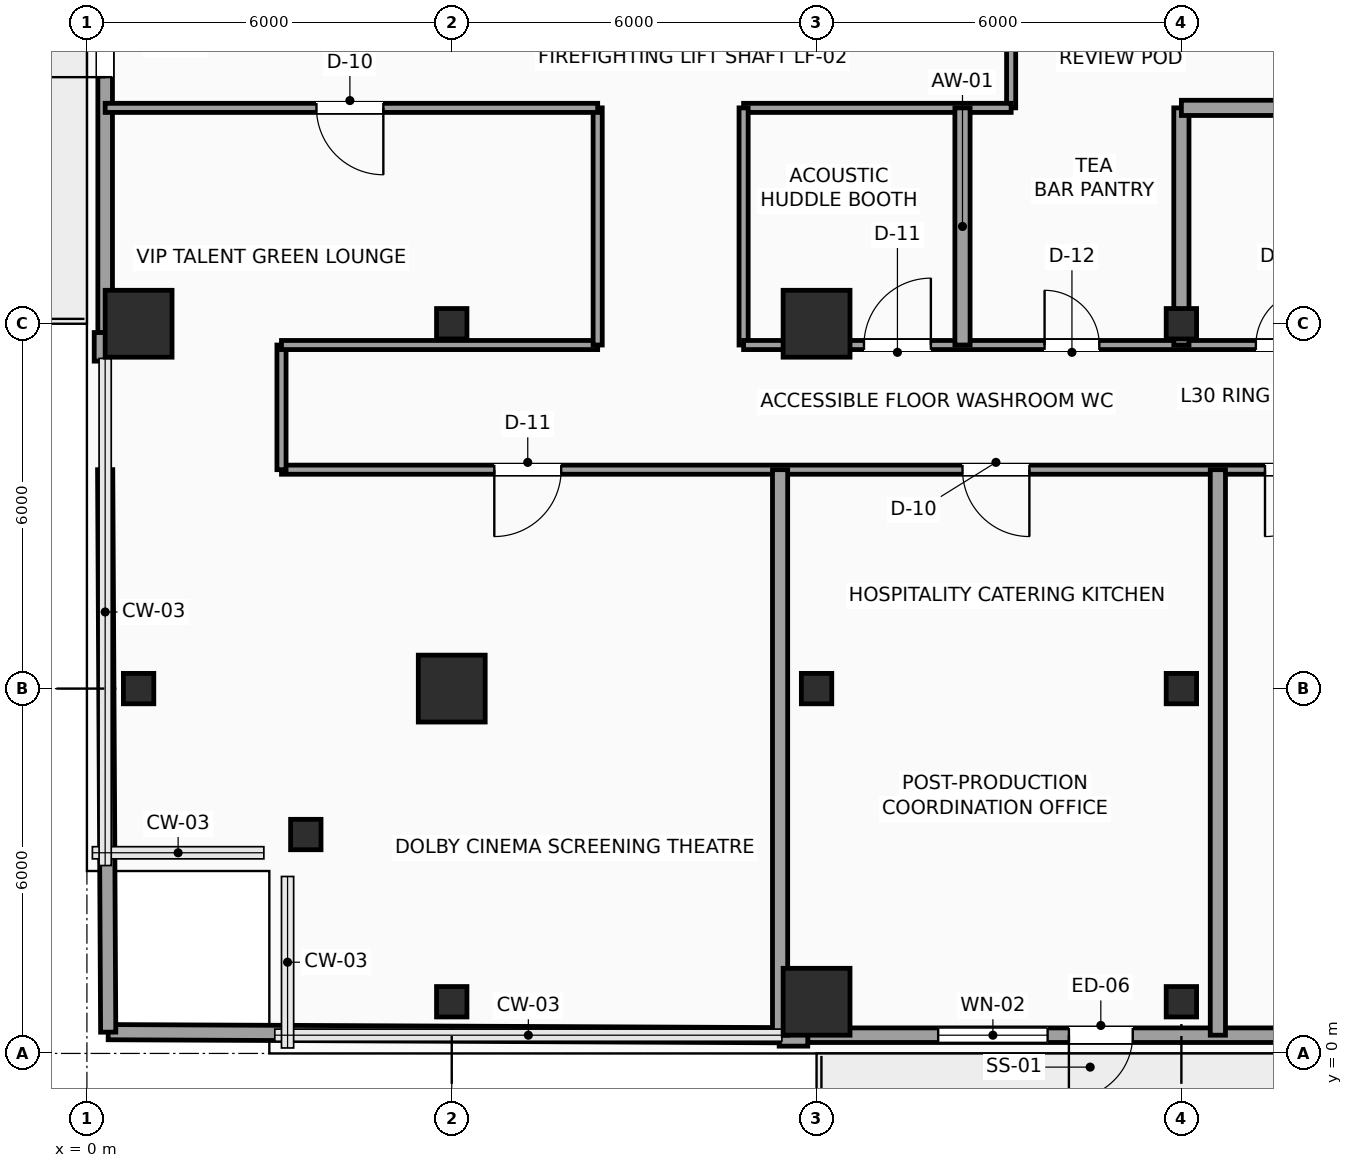
"""IFC4 building model, lengths in metres.
Left out: names, types, materials, properties, quantities, classifications, styles, units other than length and angle.
Written with IfcOpenShell. Run it as: python <this file> out.ifc"""

import sys

from ifc_helpers import new_model, si_unit, direction, frame, frame_2d, origin, origin_2d, place, context, subcontext, project, spatial, rectangle, hollow_rectangle, extrude, element, fill, save


model = new_model("IFC4")
c1 = context("Model", 3, precision=1e-05, world=origin(), true_north=direction((0.0, 1.0)))
c2 = subcontext(c1, "Body", "Model", "MODEL_VIEW")
j1 = project(units=[si_unit("LENGTHUNIT", "METRE"), si_unit("PLANEANGLEUNIT", "RADIAN")], contexts=[c1])
p1 = place(None, origin())
s1 = spatial("IfcSite", under=j1, at=p1, CompositionType="ELEMENT")
p2 = place(p1, origin())
s2 = spatial("IfcBuilding", under=s1, at=p2, CompositionType="ELEMENT")
p3 = place(p2, frame((0.0, 0.0, 126.9)))
s3 = spatial("IfcBuildingStorey", under=s2, at=p3, CompositionType="ELEMENT", Elevation=126.9)
for number, where, z_axis, x_axis in (
    (1, (3.6, 3.6, 0.0), (0.0, 0.0, 1.0), (1.0, 0.0, 0.0)),
    (2, (0.85, 6.0, 0.0), (0.0, 0.0, 1.0), (1.0, 0.0, 0.0)),
):
    element("IfcColumn", number, at=place(p3, frame(where, z_axis=z_axis, x_axis=x_axis)), inside=s3, PredefinedType="COLUMN", context=c2, shape_type="SweptSolid", body=[
        extrude(hollow_rectangle(XDim=0.5, YDim=0.5, WallThickness=0.025, InnerFilletRadius=0.025, OuterFilletRadius=0.04, at=origin_2d()), origin(), (0.0, 0.0, 1.0), 3.75),
    ])
p4 = place(p3, frame((0.85, 12.0, 0.0), z_axis=(0.0, 0.0, 1.0), x_axis=(1.0, 0.0, 0.0)))
e3 = element("IfcColumn", 3, at=p4, inside=s3, PredefinedType="COLUMN", context=c2, shape_type="SweptSolid", body=[
    extrude(rectangle(XDim=1.1, YDim=1.1, at=origin_2d()), origin(), (0.0, 0.0, 1.0), 3.75),
])
p5 = place(p3, frame((6.0, 0.85, 0.0), z_axis=(0.0, 0.0, 1.0), x_axis=(1.0, 0.0, 0.0)))
e4 = element("IfcColumn", 4, at=p5, inside=s3, PredefinedType="COLUMN", context=c2, shape_type="SweptSolid", body=[
    extrude(hollow_rectangle(XDim=0.5, YDim=0.5, WallThickness=0.025, InnerFilletRadius=0.025, OuterFilletRadius=0.04, at=origin_2d()), origin(), (0.0, 0.0, 1.0), 3.75),
])
p6 = place(p3, frame((6.0, 6.0, 0.0), z_axis=(0.0, 0.0, 1.0), x_axis=(1.0, 0.0, 0.0)))
e5 = element("IfcColumn", 5, at=p6, inside=s3, PredefinedType="COLUMN", context=c2, shape_type="SweptSolid", body=[
    extrude(rectangle(XDim=1.1, YDim=1.1, at=origin_2d()), origin(), (0.0, 0.0, 1.0), 3.75),
])
p7 = place(p3, frame((6.0, 12.0, 0.0), z_axis=(0.0, 0.0, 1.0), x_axis=(1.0, 0.0, 0.0)))
e6 = element("IfcColumn", 6, at=p7, inside=s3, PredefinedType="COLUMN", context=c2, shape_type="SweptSolid", body=[
    extrude(hollow_rectangle(XDim=0.5, YDim=0.5, WallThickness=0.025, InnerFilletRadius=0.025, OuterFilletRadius=0.04, at=origin_2d()), origin(), (0.0, 0.0, 1.0), 3.75),
])
p8 = place(p3, frame((12.0, 0.85, 0.0), z_axis=(0.0, 0.0, 1.0), x_axis=(1.0, 0.0, 0.0)))
e7 = element("IfcColumn", 7, at=p8, inside=s3, PredefinedType="COLUMN", context=c2, shape_type="SweptSolid", body=[
    extrude(rectangle(XDim=1.1, YDim=1.1, at=origin_2d()), origin(), (0.0, 0.0, 1.0), 3.75),
])
p9 = place(p3, frame((12.0, 6.0, 0.0), z_axis=(0.0, 0.0, 1.0), x_axis=(1.0, 0.0, 0.0)))
e8 = element("IfcColumn", 8, at=p9, inside=s3, PredefinedType="COLUMN", context=c2, shape_type="SweptSolid", body=[
    extrude(hollow_rectangle(XDim=0.5, YDim=0.5, WallThickness=0.025, InnerFilletRadius=0.025, OuterFilletRadius=0.04, at=origin_2d()), origin(), (0.0, 0.0, 1.0), 3.75),
])
p10 = place(p3, frame((12.0, 12.0, 0.0), z_axis=(0.0, 0.0, 1.0), x_axis=(1.0, 0.0, 0.0)))
e9 = element("IfcColumn", 9, at=p10, inside=s3, PredefinedType="COLUMN", context=c2, shape_type="SweptSolid", body=[
    extrude(rectangle(XDim=1.1, YDim=1.1, at=origin_2d()), origin(), (0.0, 0.0, 1.0), 3.75),
])
for number, where, z_axis, x_axis in (
    (10, (18.0, 0.85, 0.0), (0.0, 0.0, 1.0), (1.0, 0.0, 0.0)),
    (11, (18.0, 6.0, 0.0), (0.0, 0.0, 1.0), (1.0, 0.0, 0.0)),
    (12, (18.0, 12.0, 0.0), (0.0, 0.0, 1.0), (1.0, 0.0, 0.0)),
):
    element("IfcColumn", number, at=place(p3, frame(where, z_axis=z_axis, x_axis=x_axis)), inside=s3, PredefinedType="COLUMN", context=c2, shape_type="SweptSolid", body=[
        extrude(hollow_rectangle(XDim=0.5, YDim=0.5, WallThickness=0.025, InnerFilletRadius=0.025, OuterFilletRadius=0.04, at=origin_2d()), origin(), (0.0, 0.0, 1.0), 3.75),
    ])
p11 = place(p3, frame((21.145, 0.3, 0.0), z_axis=(0.0, 0.0, 1.0), x_axis=(-1.0, 0.0, 0.0)))
e13 = element("IfcWall", 13, at=p11, inside=s3, PredefinedType="SOLIDWALL", context=c2, shape_type="SweptSolid", body=[
    extrude(rectangle(XDim=9.29, YDim=0.24, at=frame_2d((4.645, 0.0))), origin(), (0.0, 0.0, 1.0), 3.525),
])
p12 = place(p11, frame((3.945, 0.0, 0.0)))
e14 = element("IfcOpeningElement", 14, at=p12, cuts=e13, PredefinedType="OPENING", context=c2, shape_type="SweptSolid", body=[
    extrude(rectangle(XDim=1.05, YDim=2.2, at=frame_2d((0.525, 1.1))), frame((0.0, 0.13, 0.0), z_axis=(0.0, -1.0, 0.0), x_axis=(1.0, 0.0, 0.0)), (0.0, 0.0, 1.0), 0.26),
])
p13 = place(p11, frame((5.345, 0.0, 0.85)))
e15 = element("IfcOpeningElement", 15, at=p13, cuts=e13, PredefinedType="OPENING", context=c2, shape_type="SweptSolid", body=[
    extrude(rectangle(XDim=1.8, YDim=2.1, at=frame_2d((0.9, 1.05))), frame((0.0, 0.13, 0.0), z_axis=(0.0, -1.0, 0.0), x_axis=(1.0, 0.0, 0.0)), (0.0, 0.0, 1.0), 0.26),
])
p14 = place(p3, frame((0.3, 11.855, 0.0), z_axis=(0.0, 0.0, 1.0), x_axis=(0.0, 1.0, 0.0)))
e16 = element("IfcWall", 16, at=p14, inside=s3, PredefinedType="SOLIDWALL", context=c2, shape_type="SweptSolid", body=[
    extrude(rectangle(XDim=9.29, YDim=0.24, at=frame_2d((4.645, 0.0))), origin(), (0.0, 0.0, 1.0), 3.525),
])
p15 = place(p14, frame((4.2, 0.0, 0.0)))
e17 = element("IfcOpeningElement", 17, at=p15, cuts=e16, PredefinedType="OPENING", context=c2, shape_type="SweptSolid", body=[
    extrude(rectangle(XDim=1.05, YDim=2.2, at=frame_2d((0.525, 1.1))), frame((0.0, 0.13, 0.0), z_axis=(0.0, -1.0, 0.0), x_axis=(1.0, 0.0, 0.0)), (0.0, 0.0, 1.0), 0.26),
])
p16 = place(p14, frame((6.8, 0.0, 0.85)))
e18 = element("IfcOpeningElement", 18, at=p16, cuts=e16, PredefinedType="OPENING", context=c2, shape_type="SweptSolid", body=[
    extrude(rectangle(XDim=1.8, YDim=2.1, at=frame_2d((0.9, 1.05))), frame((0.0, 0.13, 0.0), z_axis=(0.0, -1.0, 0.0), x_axis=(1.0, 0.0, 0.0)), (0.0, 0.0, 1.0), 0.26),
])
for number, where, z_axis, x_axis in (
    (19, (0.24, 11.385, 0.0), (0.0, 0.0, 1.0), (0.0, 1.0, 0.0)),
    (20, (11.855, 0.24, 0.0), (0.0, 0.0, 1.0), (-1.0, 0.0, 0.0)),
):
    element("IfcWall", number, at=place(p3, frame(where, z_axis=z_axis, x_axis=x_axis)), inside=s3, PredefinedType="SOLIDWALL", context=c2, shape_type="SweptSolid", body=[
        extrude(rectangle(XDim=0.47, YDim=0.24, at=frame_2d((0.235, 0.0))), origin(), (0.0, 0.0, 1.0), 3.525),
    ])
p17 = place(p3, frame((21.35, 9.6, 0.0), z_axis=(0.0, 0.0, 1.0), x_axis=(-1.0, 0.0, 0.0)))
e21 = element("IfcWall", 21, at=p17, inside=s3, PredefinedType="PARTITIONING", context=c2, shape_type="SweptSolid", body=[
    extrude(rectangle(XDim=18.15, YDim=0.15, at=frame_2d((9.075, 0.0))), origin(), (0.0, 0.0, 1.0), 3.525),
])
p18 = place(p17, frame((13.55, 0.0, 0.0)))
e22 = element("IfcOpeningElement", 22, at=p18, cuts=e21, PredefinedType="OPENING", context=c2, shape_type="SweptSolid", body=[
    extrude(rectangle(XDim=1.1, YDim=2.25, at=frame_2d((0.55, 1.125))), frame((0.0, 0.085, 0.0), z_axis=(0.0, -1.0, 0.0), x_axis=(1.0, 0.0, 0.0)), (0.0, 0.0, 1.0), 0.17),
])
p19 = place(p17, frame((5.85, 0.0, 0.0)))
e23 = element("IfcOpeningElement", 23, at=p19, cuts=e21, PredefinedType="OPENING", context=c2, shape_type="SweptSolid", body=[
    extrude(rectangle(XDim=1.1, YDim=2.25, at=frame_2d((0.55, 1.125))), frame((0.0, 0.085, 0.0), z_axis=(0.0, -1.0, 0.0), x_axis=(1.0, 0.0, 0.0)), (0.0, 0.0, 1.0), 0.17),
])
p20 = place(p17, frame((0.875, 0.0, 0.0)))
e24 = element("IfcOpeningElement", 24, at=p20, cuts=e21, PredefinedType="OPENING", context=c2, shape_type="SweptSolid", body=[
    extrude(rectangle(XDim=1.1, YDim=2.25, at=frame_2d((0.55, 1.125))), frame((0.0, 0.085, 0.0), z_axis=(0.0, -1.0, 0.0), x_axis=(1.0, 0.0, 0.0)), (0.0, 0.0, 1.0), 0.17),
])
p21 = place(p3, frame((3.2, 9.6, 0.0), z_axis=(0.0, 0.0, 1.0), x_axis=(0.0, 1.0, 0.0)))
e25 = element("IfcWall", 25, at=p21, inside=s3, PredefinedType="PARTITIONING", context=c2, shape_type="SweptSolid", body=[
    extrude(rectangle(XDim=2.05, YDim=0.15, at=frame_2d((1.025, 0.0))), origin(), (0.0, 0.0, 1.0), 3.525),
])
p22 = place(p3, frame((3.2, 11.65, 0.0), z_axis=(0.0, 0.0, 1.0), x_axis=(1.0, 0.0, 0.0)))
e26 = element("IfcWall", 26, at=p22, inside=s3, PredefinedType="PARTITIONING", context=c2, shape_type="SweptSolid", body=[
    extrude(rectangle(XDim=5.2, YDim=0.15, at=frame_2d((2.6, 0.0))), origin(), (0.0, 0.0, 1.0), 3.525),
])
p23 = place(p3, frame((8.4, 11.65, 0.0), z_axis=(0.0, 0.0, 1.0), x_axis=(0.0, 1.0, 0.0)))
e27 = element("IfcWall", 27, at=p23, inside=s3, PredefinedType="PARTITIONING", context=c2, shape_type="SweptSolid", body=[
    extrude(rectangle(XDim=3.9, YDim=0.15, at=frame_2d((1.95, 0.0))), origin(), (0.0, 0.0, 1.0), 3.525),
])
p24 = place(p3, frame((8.4, 15.55, 0.0), z_axis=(0.0, 0.0, 1.0), x_axis=(-1.0, 0.0, 0.0)))
e28 = element("IfcWall", 28, at=p24, inside=s3, PredefinedType="PARTITIONING", context=c2, shape_type="SweptSolid", body=[
    extrude(rectangle(XDim=8.1, YDim=0.15, at=frame_2d((4.05, 0.0))), origin(), (0.0, 0.0, 1.0), 3.525),
])
p25 = place(p24, frame((3.525, 0.0, 0.0)))
e29 = element("IfcOpeningElement", 29, at=p25, cuts=e28, PredefinedType="OPENING", context=c2, shape_type="SweptSolid", body=[
    extrude(rectangle(XDim=1.1, YDim=2.25, at=frame_2d((0.55, 1.125))), frame((0.0, 0.085, 0.0), z_axis=(0.0, -1.0, 0.0), x_axis=(1.0, 0.0, 0.0)), (0.0, 0.0, 1.0), 0.17),
])
p26 = place(p3, frame((15.2, 17.95, 0.0), z_axis=(0.0, 0.0, 1.0), x_axis=(0.0, -1.0, 0.0)))
e30 = element("IfcWall", 30, at=p26, inside=s3, PredefinedType="PARTITIONING", context=c2, shape_type="SweptSolid", body=[
    extrude(rectangle(XDim=2.4, YDim=0.15, at=frame_2d((1.2, 0.0))), origin(), (0.0, 0.0, 1.0), 3.525),
])
p27 = place(p3, frame((15.2, 15.55, 0.0), z_axis=(0.0, 0.0, 1.0), x_axis=(-1.0, 0.0, 0.0)))
e31 = element("IfcWall", 31, at=p27, inside=s3, PredefinedType="PARTITIONING", context=c2, shape_type="SweptSolid", body=[
    extrude(rectangle(XDim=4.4, YDim=0.15, at=frame_2d((2.2, 0.0))), origin(), (0.0, 0.0, 1.0), 3.525),
])
p28 = place(p3, frame((10.8, 15.55, 0.0), z_axis=(0.0, 0.0, 1.0), x_axis=(0.0, -1.0, 0.0)))
e32 = element("IfcWall", 32, at=p28, inside=s3, PredefinedType="PARTITIONING", context=c2, shape_type="SweptSolid", body=[
    extrude(rectangle(XDim=3.9, YDim=0.15, at=frame_2d((1.95, 0.0))), origin(), (0.0, 0.0, 1.0), 3.525),
])
p29 = place(p3, frame((10.8, 11.65, 0.0), z_axis=(0.0, 0.0, 1.0), x_axis=(1.0, 0.0, 0.0)))
e33 = element("IfcWall", 33, at=p29, inside=s3, PredefinedType="PARTITIONING", context=c2, shape_type="SweptSolid", body=[
    extrude(rectangle(XDim=10.55, YDim=0.15, at=frame_2d((5.275, 0.0))), origin(), (0.0, 0.0, 1.0), 3.525),
])
p30 = place(p29, frame((1.98, 0.0, 0.0)))
e34 = element("IfcOpeningElement", 34, at=p30, cuts=e33, PredefinedType="OPENING", context=c2, shape_type="SweptSolid", body=[
    extrude(rectangle(XDim=1.1, YDim=2.25, at=frame_2d((0.55, 1.125))), frame((0.0, 0.085, 0.0), z_axis=(0.0, -1.0, 0.0), x_axis=(1.0, 0.0, 0.0)), (0.0, 0.0, 1.0), 0.17),
])
p31 = place(p29, frame((4.95, 0.0, 0.0)))
e35 = element("IfcOpeningElement", 35, at=p31, cuts=e33, PredefinedType="OPENING", context=c2, shape_type="SweptSolid", body=[
    extrude(rectangle(XDim=0.9, YDim=2.1, at=frame_2d((0.45, 1.05))), frame((0.0, 0.085, 0.0), z_axis=(0.0, -1.0, 0.0), x_axis=(1.0, 0.0, 0.0)), (0.0, 0.0, 1.0), 0.17),
])
p32 = place(p29, frame((8.425, 0.0, 0.0)))
e36 = element("IfcOpeningElement", 36, at=p32, cuts=e33, PredefinedType="OPENING", context=c2, shape_type="SweptSolid", body=[
    extrude(rectangle(XDim=0.9, YDim=2.1, at=frame_2d((0.45, 1.05))), frame((0.0, 0.085, 0.0), z_axis=(0.0, -1.0, 0.0), x_axis=(1.0, 0.0, 0.0)), (0.0, 0.0, 1.0), 0.17),
])
p33 = place(p3, frame((14.4, 11.65, 0.0), z_axis=(0.0, 0.0, 1.0), x_axis=(0.0, 1.0, 0.0)))
e37 = element("IfcWall", 37, at=p33, inside=s3, PredefinedType="PARTITIONING", context=c2, shape_type="SweptSolid", body=[
    extrude(rectangle(XDim=3.9, YDim=0.25, at=frame_2d((1.95, 0.0))), origin(), (0.0, 0.0, 1.0), 3.525),
])
p34 = place(p3, frame((18.0, 11.65, 0.0), z_axis=(0.0, 0.0, 1.0), x_axis=(0.0, 1.0, 0.0)))
e38 = element("IfcWall", 38, at=p34, inside=s3, PredefinedType="PARTITIONING", context=c2, shape_type="SweptSolid", body=[
    extrude(rectangle(XDim=3.9, YDim=0.25, at=frame_2d((1.95, 0.0))), origin(), (0.0, 0.0, 1.0), 3.017),
])
p35 = place(p3, frame((18.0, 15.55, 0.0), z_axis=(0.0, 0.0, 1.0), x_axis=(1.0, 0.0, 0.0)))
e39 = element("IfcWall", 39, at=p35, inside=s3, PredefinedType="PARTITIONING", context=c2, shape_type="SweptSolid", body=[
    extrude(rectangle(XDim=3.35, YDim=0.25, at=frame_2d((1.675, 0.0))), origin(), (0.0, 0.0, 1.0), 3.525),
])
p36 = place(p3, frame((0.35, 0.35, 0.0), z_axis=(0.0, 0.0, 1.0), x_axis=(0.999989714785, -0.004535451924, 0.0)))
e40 = element("IfcWall", 40, at=p36, inside=s3, PredefinedType="PARTITIONING", context=c2, shape_type="SweptSolid", body=[
    extrude(rectangle(XDim=11.035, YDim=0.25, at=frame_2d((5.518, 0.0))), origin(), (0.0, 0.0, 1.0), 3.525),
])
p37 = place(p3, frame((0.35, 0.35, 0.0), z_axis=(0.0, 0.0, 1.0), x_axis=(-0.005410604923, 0.99998536257, 0.0)))
e41 = element("IfcWall", 41, at=p37, inside=s3, PredefinedType="PARTITIONING", context=c2, shape_type="SweptSolid", body=[
    extrude(rectangle(XDim=9.25, YDim=0.25, at=frame_2d((4.625, 0.0))), origin(), (0.0, 0.0, 1.0), 3.525),
])
for number, where, z_axis, x_axis in (
    (42, (11.4, 0.3, 0.0), (0.0, 0.0, 1.0), (0.0, 1.0, 0.0)),
    (43, (18.6, 0.3, 0.0), (0.0, 0.0, 1.0), (0.0, 1.0, 0.0)),
):
    element("IfcWall", number, at=place(p3, frame(where, z_axis=z_axis, x_axis=x_axis)), inside=s3, PredefinedType="PARTITIONING", context=c2, shape_type="SweptSolid", body=[
        extrude(rectangle(XDim=9.3, YDim=0.25, at=frame_2d((4.65, 0.0))), origin(), (0.0, 0.0, 1.0), 3.525),
    ])
p38 = place(p12, origin())
e44 = element("IfcDoor", 44, at=p38, inside=s3, OperationType="SINGLE_SWING_RIGHT", PredefinedType="DOOR", context=c2, shape_type="SweptSolid", body=[
    extrude(rectangle(XDim=1.05, YDim=2.2, at=frame_2d((0.525, 1.1))), frame((0.0, 0.025, 0.0), z_axis=(0.0, -1.0, 0.0), x_axis=(1.0, 0.0, 0.0)), (0.0, 0.0, 1.0), 0.05),
])
fill(e14, e44)
p39 = place(p13, origin())
e45 = element("IfcWindow", 45, at=p39, inside=s3, PartitioningType="SINGLE_PANEL", PredefinedType="WINDOW", context=c2, shape_type="SweptSolid", body=[
    extrude(rectangle(XDim=1.8, YDim=2.1, at=frame_2d((0.9, 1.05))), frame((0.0, 0.03, 0.0), z_axis=(0.0, -1.0, 0.0), x_axis=(1.0, 0.0, 0.0)), (0.0, 0.0, 1.0), 0.06),
])
fill(e15, e45)
p40 = place(p15, origin())
e46 = element("IfcDoor", 46, at=p40, inside=s3, OperationType="SINGLE_SWING_LEFT", PredefinedType="DOOR", context=c2, shape_type="SweptSolid", body=[
    extrude(rectangle(XDim=1.05, YDim=2.2, at=frame_2d((0.525, 1.1))), frame((0.0, 0.025, 0.0), z_axis=(0.0, -1.0, 0.0), x_axis=(1.0, 0.0, 0.0)), (0.0, 0.0, 1.0), 0.05),
])
fill(e17, e46)
p41 = place(p18, origin())
e47 = element("IfcDoor", 47, at=p41, inside=s3, OperationType="SINGLE_SWING_RIGHT", PredefinedType="DOOR", context=c2, shape_type="SweptSolid", body=[
    extrude(rectangle(XDim=1.1, YDim=2.25, at=frame_2d((0.55, 1.125))), frame((0.0, 0.025, 0.0), z_axis=(0.0, -1.0, 0.0), x_axis=(1.0, 0.0, 0.0)), (0.0, 0.0, 1.0), 0.05),
])
fill(e22, e47)
p42 = place(p19, origin())
e48 = element("IfcDoor", 48, at=p42, inside=s3, OperationType="SINGLE_SWING_LEFT", PredefinedType="DOOR", context=c2, shape_type="SweptSolid", body=[
    extrude(rectangle(XDim=1.1, YDim=2.25, at=frame_2d((0.55, 1.125))), frame((0.0, 0.025, 0.0), z_axis=(0.0, -1.0, 0.0), x_axis=(1.0, 0.0, 0.0)), (0.0, 0.0, 1.0), 0.05),
])
fill(e23, e48)
p43 = place(p20, origin())
e49 = element("IfcDoor", 49, at=p43, inside=s3, OperationType="SINGLE_SWING_RIGHT", PredefinedType="DOOR", context=c2, shape_type="SweptSolid", body=[
    extrude(rectangle(XDim=1.1, YDim=2.25, at=frame_2d((0.55, 1.125))), frame((0.0, 0.025, 0.0), z_axis=(0.0, -1.0, 0.0), x_axis=(1.0, 0.0, 0.0)), (0.0, 0.0, 1.0), 0.05),
])
fill(e24, e49)
p44 = place(p25, origin())
e50 = element("IfcDoor", 50, at=p44, inside=s3, OperationType="SINGLE_SWING_LEFT", PredefinedType="DOOR", context=c2, shape_type="SweptSolid", body=[
    extrude(rectangle(XDim=1.1, YDim=2.25, at=frame_2d((0.55, 1.125))), frame((0.0, 0.025, 0.0), z_axis=(0.0, -1.0, 0.0), x_axis=(1.0, 0.0, 0.0)), (0.0, 0.0, 1.0), 0.05),
])
fill(e29, e50)
p45 = place(p30, origin())
e51 = element("IfcDoor", 51, at=p45, inside=s3, OperationType="SINGLE_SWING_RIGHT", PredefinedType="DOOR", context=c2, shape_type="SweptSolid", body=[
    extrude(rectangle(XDim=1.1, YDim=2.25, at=frame_2d((0.55, 1.125))), frame((0.0, 0.025, 0.0), z_axis=(0.0, -1.0, 0.0), x_axis=(1.0, 0.0, 0.0)), (0.0, 0.0, 1.0), 0.05),
])
fill(e34, e51)
p46 = place(p31, origin())
e52 = element("IfcDoor", 52, at=p46, inside=s3, OperationType="SINGLE_SWING_LEFT", PredefinedType="DOOR", context=c2, shape_type="SweptSolid", body=[
    extrude(rectangle(XDim=0.9, YDim=2.1, at=frame_2d((0.45, 1.05))), frame((0.0, 0.025, 0.0), z_axis=(0.0, -1.0, 0.0), x_axis=(1.0, 0.0, 0.0)), (0.0, 0.0, 1.0), 0.05),
])
fill(e35, e52)
p47 = place(p32, origin())
e53 = element("IfcDoor", 53, at=p47, inside=s3, OperationType="SINGLE_SWING_RIGHT", PredefinedType="DOOR", context=c2, shape_type="SweptSolid", body=[
    extrude(rectangle(XDim=0.9, YDim=2.1, at=frame_2d((0.45, 1.05))), frame((0.0, 0.025, 0.0), z_axis=(0.0, -1.0, 0.0), x_axis=(1.0, 0.0, 0.0)), (0.0, 0.0, 1.0), 0.05),
])
fill(e36, e53)
save(model, sys.argv[1])
